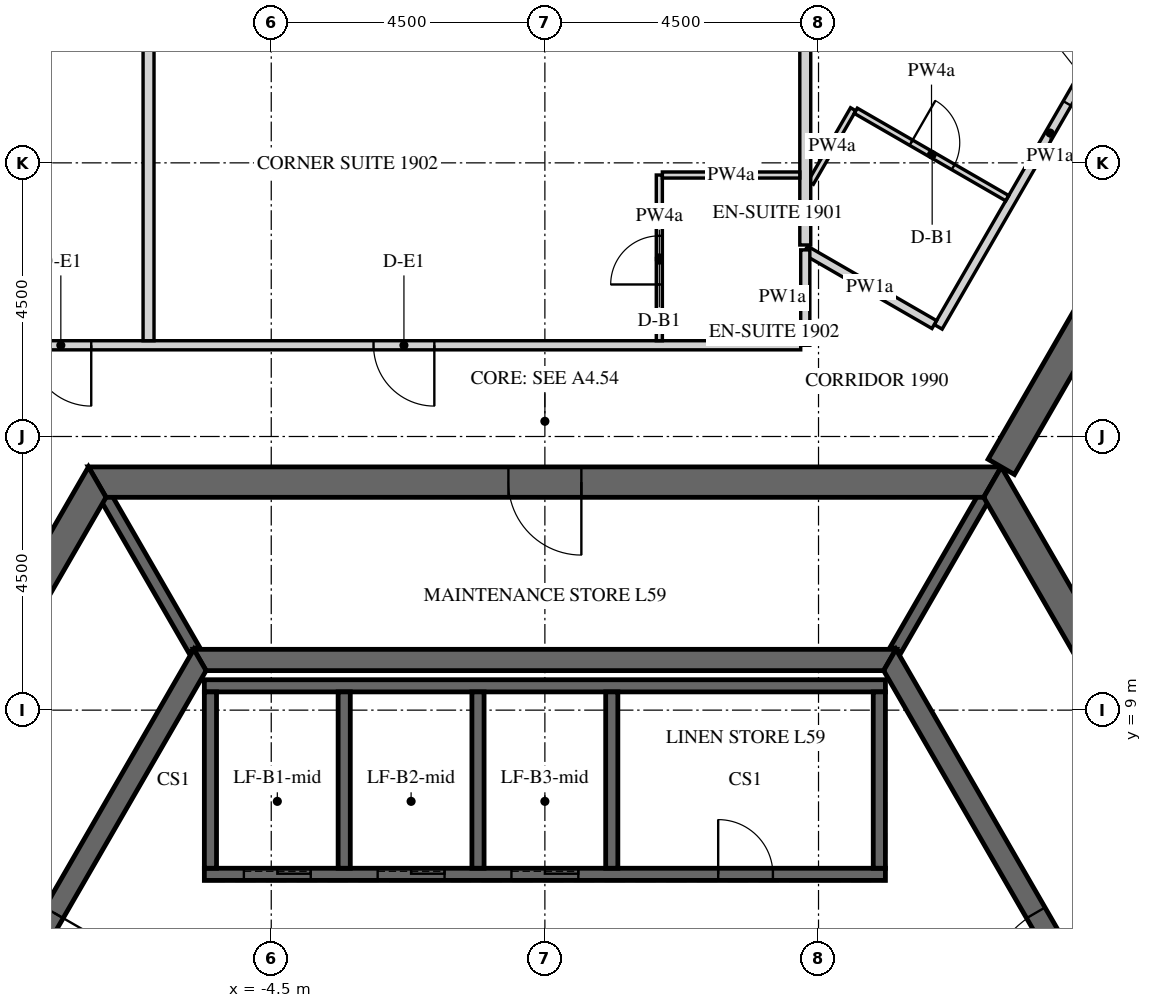
"""IFC4 building model, lengths in metres.
Left out: names, types, materials, properties, quantities, classifications, styles, units other than length and angle.
Written with IfcOpenShell. Run it as: python <this file> out.ifc"""

import sys

from ifc_helpers import new_model, si_unit, direction, frame, frame_2d, origin, place, context, subcontext, project, spatial, polyline, rectangle, outline, extrude, element, fill, save


model = new_model("IFC4")
c1 = context("Model", 3, precision=1e-05, world=origin(), true_north=direction((0.0, 1.0)))
c2 = subcontext(c1, "Body", "Model", "MODEL_VIEW")
j1 = project(units=[si_unit("LENGTHUNIT", "METRE"), si_unit("PLANEANGLEUNIT", "RADIAN")], contexts=[c1])
p1 = place(None, origin())
s1 = spatial("IfcSite", under=j1, at=p1, CompositionType="ELEMENT")
p2 = place(p1, origin())
s2 = spatial("IfcBuilding", under=s1, at=p2, CompositionType="ELEMENT")
p3 = place(p2, frame((0.0, 0.0, 246.3)))
s3 = spatial("IfcBuildingStorey", under=s2, at=p3, CompositionType="ELEMENT", Elevation=246.3)
p4 = place(p3, frame((-7.361, 12.75, -0.15), z_axis=(0.0, 0.0, 1.0), x_axis=(-0.50000571537, -0.866022103989, 0.0)))
e1 = element("IfcWall", 1, at=p4, inside=s3, PredefinedType="SHEAR", context=c2, shape_type="SweptSolid", body=[
    extrude(outline(polyline([(-0.144, -0.25), (14.867, -0.25), (14.578, 0.25), (0.144, 0.25), (-0.144, -0.25)])), origin(), (0.0, 0.0, 1.0), 3.75),
])
p5 = place(p4, frame((6.49, 0.0, 0.15)))
e2 = element("IfcOpeningElement", 2, at=p5, cuts=e1, PredefinedType="OPENING", context=c2, shape_type="SweptSolid", body=[
    extrude(rectangle(XDim=1.8, YDim=2.4, at=frame_2d((0.9, 1.2))), frame((0.0, 0.26, 0.0), z_axis=(0.0, -1.0, 0.0), x_axis=(1.0, 0.0, 0.0)), (0.0, 0.0, 1.0), 0.52),
])
p6 = place(p3, frame((14.722, 0.0, -0.15), z_axis=(0.0, 0.0, 1.0), x_axis=(-0.50000571537, 0.866022103989, 0.0)))
e3 = element("IfcWall", 3, at=p6, inside=s3, PredefinedType="SHEAR", context=c2, shape_type="SweptSolid", body=[
    extrude(outline(polyline([(-0.144, -0.25), (14.867, -0.25), (14.578, 0.25), (0.144, 0.25), (-0.144, -0.25)])), origin(), (0.0, 0.0, 1.0), 3.75),
])
p7 = place(p6, frame((6.432, 0.0, 0.15)))
e4 = element("IfcOpeningElement", 4, at=p7, cuts=e3, PredefinedType="OPENING", context=c2, shape_type="SweptSolid", body=[
    extrude(rectangle(XDim=1.8, YDim=2.4, at=frame_2d((0.9, 1.2))), frame((0.0, 0.26, 0.0), z_axis=(0.0, -1.0, 0.0), x_axis=(1.0, 0.0, 0.0)), (0.0, 0.0, 1.0), 0.52),
])
p8 = place(p3, frame((7.361, 12.75, -0.15), z_axis=(0.0, 0.0, 1.0), x_axis=(-1.0, 0.0, 0.0)))
e5 = element("IfcWall", 5, at=p8, inside=s3, PredefinedType="SHEAR", context=c2, shape_type="SweptSolid", body=[
    extrude(outline(polyline([(-0.144, -0.25), (14.866, -0.25), (14.578, 0.25), (0.144, 0.25), (-0.144, -0.25)])), origin(), (0.0, 0.0, 1.0), 3.75),
])
p9 = place(p8, frame((6.761, 0.0, 0.15)))
e6 = element("IfcOpeningElement", 6, at=p9, cuts=e5, PredefinedType="OPENING", context=c2, shape_type="SweptSolid", body=[
    extrude(rectangle(XDim=1.2, YDim=2.4, at=frame_2d((0.6, 1.2))), frame((0.0, 0.26, 0.0), z_axis=(0.0, -1.0, 0.0), x_axis=(1.0, 0.0, 0.0)), (0.0, 0.0, 1.0), 0.52),
])
p10 = place(p3, frame((7.506, 13.0, -0.15), z_axis=(0.0, 0.0, 1.0), x_axis=(0.499988271576, 0.866032175087, 0.0)))
e7 = element("IfcWall", 7, at=p10, inside=s3, PredefinedType="SHEAR", context=c2, shape_type="SweptSolid", body=[
    extrude(rectangle(XDim=15.424, YDim=0.5, at=frame_2d((7.712, 0.0))), origin(), (0.0, 0.0, 1.0), 3.75),
])
p11 = place(p10, frame((6.812, 0.0, 0.15)))
e8 = element("IfcOpeningElement", 8, at=p11, cuts=e7, PredefinedType="OPENING", context=c2, shape_type="SweptSolid", body=[
    extrude(rectangle(XDim=1.8, YDim=2.4, at=frame_2d((0.9, 1.2))), frame((0.0, 0.26, 0.0), z_axis=(0.0, -1.0, 0.0), x_axis=(1.0, 0.0, 0.0)), (0.0, 0.0, 1.0), 0.52),
])
p12 = place(p3, frame((-5.673, 9.825, -0.15), z_axis=(0.0, 0.0, 1.0), x_axis=(-0.499995046907, -0.866028263435, 0.0)))
e9 = element("IfcWall", 9, at=p12, inside=s3, PredefinedType="SHEAR", context=c2, shape_type="SweptSolid", body=[
    extrude(outline(polyline([(-0.101, -0.175), (11.446, -0.175), (11.244, 0.175), (0.101, 0.175), (-0.101, -0.175)])), origin(), (0.0, 0.0, 1.0), 3.75),
])
p13 = place(p12, frame((4.801, 0.0, 0.15)))
e10 = element("IfcOpeningElement", 10, at=p13, cuts=e9, PredefinedType="OPENING", context=c2, shape_type="SweptSolid", body=[
    extrude(rectangle(XDim=1.8, YDim=2.4, at=frame_2d((0.9, 1.2))), frame((0.0, 0.185, 0.0), z_axis=(0.0, -1.0, 0.0), x_axis=(1.0, 0.0, 0.0)), (0.0, 0.0, 1.0), 0.37),
])
p14 = place(p3, frame((11.345, 0.0, -0.15), z_axis=(0.0, 0.0, 1.0), x_axis=(-0.499995046907, 0.866028263435, 0.0)))
e11 = element("IfcWall", 11, at=p14, inside=s3, PredefinedType="SHEAR", context=c2, shape_type="SweptSolid", body=[
    extrude(outline(polyline([(-0.101, -0.175), (11.446, -0.175), (11.244, 0.175), (0.101, 0.175), (-0.101, -0.175)])), origin(), (0.0, 0.0, 1.0), 3.75),
])
p15 = place(p14, frame((4.744, 0.0, 0.15)))
e12 = element("IfcOpeningElement", 12, at=p15, cuts=e11, PredefinedType="OPENING", context=c2, shape_type="SweptSolid", body=[
    extrude(rectangle(XDim=1.8, YDim=2.4, at=frame_2d((0.9, 1.2))), frame((0.0, 0.185, 0.0), z_axis=(0.0, -1.0, 0.0), x_axis=(1.0, 0.0, 0.0)), (0.0, 0.0, 1.0), 0.37),
])
p16 = place(p3, frame((5.673, 9.825, -0.15), z_axis=(0.0, 0.0, 1.0), x_axis=(-1.0, 0.0, 0.0)))
e13 = element("IfcWall", 13, at=p16, inside=s3, PredefinedType="SHEAR", context=c2, shape_type="SweptSolid", body=[
    extrude(outline(polyline([(-0.101, -0.175), (11.446, -0.175), (11.244, 0.175), (0.101, 0.175), (-0.101, -0.175)])), origin(), (0.0, 0.0, 1.0), 3.75),
])
p17 = place(p3, frame((-5.6, 6.3, -0.25), z_axis=(0.0, 0.0, 1.0), x_axis=(1.0, 0.0, 0.0)))
e14 = element("IfcWall", 14, at=p17, inside=s3, PredefinedType="SHEAR", context=c2, shape_type="SweptSolid", body=[
    extrude(rectangle(XDim=11.2, YDim=0.2, at=frame_2d((5.6, 0.0))), origin(), (0.0, 0.0, 1.0), 3.9),
])
p18 = place(p17, frame((8.45, 0.0, 0.25)))
e15 = element("IfcOpeningElement", 15, at=p18, cuts=e14, PredefinedType="OPENING", context=c2, shape_type="SweptSolid", body=[
    extrude(rectangle(XDim=0.9, YDim=2.1, at=frame_2d((0.45, 1.05))), frame((0.0, 0.11, 0.0), z_axis=(0.0, -1.0, 0.0), x_axis=(1.0, 0.0, 0.0)), (0.0, 0.0, 1.0), 0.22),
])
p19 = place(p17, frame((0.65, 0.0, 0.25)))
e16 = element("IfcOpeningElement", 16, at=p19, cuts=e14, PredefinedType="OPENING", context=c2, shape_type="SweptSolid", body=[
    extrude(rectangle(XDim=1.1, YDim=2.1, at=frame_2d((0.55, 1.05))), frame((0.0, 0.11, 0.0), z_axis=(0.0, -1.0, 0.0), x_axis=(1.0, 0.0, 0.0)), (0.0, 0.0, 1.0), 0.22),
])
p20 = place(p17, frame((2.85, 0.0, 0.25)))
e17 = element("IfcOpeningElement", 17, at=p20, cuts=e14, PredefinedType="OPENING", context=c2, shape_type="SweptSolid", body=[
    extrude(rectangle(XDim=1.1, YDim=2.1, at=frame_2d((0.55, 1.05))), frame((0.0, 0.11, 0.0), z_axis=(0.0, -1.0, 0.0), x_axis=(1.0, 0.0, 0.0)), (0.0, 0.0, 1.0), 0.22),
])
p21 = place(p17, frame((5.05, 0.0, 0.25)))
e18 = element("IfcOpeningElement", 18, at=p21, cuts=e14, PredefinedType="OPENING", context=c2, shape_type="SweptSolid", body=[
    extrude(rectangle(XDim=1.1, YDim=2.1, at=frame_2d((0.55, 1.05))), frame((0.0, 0.11, 0.0), z_axis=(0.0, -1.0, 0.0), x_axis=(1.0, 0.0, 0.0)), (0.0, 0.0, 1.0), 0.22),
])
p22 = place(p3, frame((-5.6, 9.4, -0.25), z_axis=(0.0, 0.0, 1.0), x_axis=(1.0, 0.0, 0.0)))
e19 = element("IfcWall", 19, at=p22, inside=s3, PredefinedType="SHEAR", context=c2, shape_type="SweptSolid", body=[
    extrude(rectangle(XDim=11.2, YDim=0.2, at=frame_2d((5.6, 0.0))), origin(), (0.0, 0.0, 1.0), 3.9),
])
for number, where, z_axis, x_axis in (
    (20, (-5.5, 6.4, -0.25), (0.0, 0.0, 1.0), (0.0, 1.0, 0.0)),
    (21, (-3.3, 6.4, -0.25), (0.0, 0.0, 1.0), (0.0, 1.0, 0.0)),
    (22, (-1.1, 6.4, -0.25), (0.0, 0.0, 1.0), (0.0, 1.0, 0.0)),
    (23, (1.1, 6.4, -0.25), (0.0, 0.0, 1.0), (0.0, 1.0, 0.0)),
    (24, (5.5, 6.4, -0.25), (0.0, 0.0, 1.0), (0.0, 1.0, 0.0)),
):
    element("IfcWall", number, at=place(p3, frame(where, z_axis=z_axis, x_axis=x_axis)), inside=s3, PredefinedType="SHEAR", context=c2, shape_type="SweptSolid", body=[
        extrude(rectangle(XDim=2.9, YDim=0.2, at=frame_2d((1.45, 0.0))), origin(), (0.0, 0.0, 1.0), 3.9),
    ])
for number, where, z_axis, x_axis in (
    (25, (5.773, 10.0, -0.15), (0.0, 0.0, 1.0), (0.5, 0.866, 0.0)),
    (26, (-5.773, 10.0, -0.15), (0.0, 0.0, 1.0), (-0.5, 0.866, 0.0)),
):
    element("IfcWall", number, at=place(p3, frame(where, z_axis=z_axis, x_axis=x_axis)), inside=s3, PredefinedType="SHEAR", context=c2, shape_type="SweptSolid", body=[
        extrude(rectangle(XDim=2.887, YDim=0.2, at=frame_2d((1.443, 0.0))), origin(), (0.0, 0.0, 1.0), 3.75),
    ])
p23 = place(p3, frame((10.149, 21.678, 0.0), z_axis=(0.0, 0.0, 1.0), x_axis=(-0.500020076982, -0.866013812023, 0.0)))
e27 = element("IfcWall", 27, at=p23, inside=s3, PredefinedType="PARTITIONING", context=c2, shape_type="SweptSolid", body=[
    extrude(rectangle(XDim=7.361, YDim=0.15, at=frame_2d((3.681, 0.0))), origin(), (0.0, 0.0, 1.0), 2.838),
])
p24 = place(p23, frame((2.118, 0.0, 0.0)))
e28 = element("IfcOpeningElement", 28, at=p24, cuts=e27, PredefinedType="OPENING", context=c2, shape_type="SweptSolid", body=[
    extrude(rectangle(XDim=1.0, YDim=2.1, at=frame_2d((0.5, 1.05))), frame((0.0, 0.085, 0.0), z_axis=(0.0, -1.0, 0.0), x_axis=(1.0, 0.0, 0.0)), (0.0, 0.0, 1.0), 0.17),
])
p25 = place(p3, frame((6.403, 15.341, 0.0), z_axis=(0.0, 0.0, 1.0), x_axis=(-0.8660013066, 0.500041735226, 0.0)))
e29 = element("IfcWall", 29, at=p25, inside=s3, PredefinedType="PARTITIONING", context=c2, shape_type="SweptSolid", body=[
    extrude(rectangle(XDim=2.449, YDim=0.15, at=frame_2d((1.225, 0.0))), origin(), (0.0, 0.0, 1.0), 2.838),
])
p26 = place(p3, frame((4.207, 15.0, 0.0), z_axis=(0.0, 0.0, 1.0), x_axis=(-1.0, 0.0, 0.0)))
e30 = element("IfcWall", 30, at=p26, inside=s3, PredefinedType="PARTITIONING", context=c2, shape_type="SweptSolid", body=[
    extrude(rectangle(XDim=12.867, YDim=0.15, at=frame_2d((6.434, 0.0))), origin(), (0.0, 0.0, 1.0), 2.838),
])
p27 = place(p26, frame((6.025, 0.0, 0.0)))
e31 = element("IfcOpeningElement", 31, at=p27, cuts=e30, PredefinedType="OPENING", context=c2, shape_type="SweptSolid", body=[
    extrude(rectangle(XDim=1.0, YDim=2.1, at=frame_2d((0.5, 1.05))), frame((0.0, 0.085, 0.0), z_axis=(0.0, -1.0, 0.0), x_axis=(1.0, 0.0, 0.0)), (0.0, 0.0, 1.0), 0.17),
])
p28 = place(p26, frame((11.667, 0.0, 0.0)))
e32 = element("IfcOpeningElement", 32, at=p28, cuts=e30, PredefinedType="OPENING", context=c2, shape_type="SweptSolid", body=[
    extrude(rectangle(XDim=1.0, YDim=2.1, at=frame_2d((0.5, 1.05))), frame((0.0, 0.085, 0.0), z_axis=(0.0, -1.0, 0.0), x_axis=(1.0, 0.0, 0.0)), (0.0, 0.0, 1.0), 0.17),
])
p29 = place(p3, frame((4.282, 16.569, 0.0), z_axis=(0.0, 0.0, 1.0), x_axis=(0.0, -1.0, 0.0)))
e33 = element("IfcWall", 33, at=p29, inside=s3, PredefinedType="PARTITIONING", context=c2, shape_type="SweptSolid", body=[
    extrude(rectangle(XDim=1.569, YDim=0.15, at=frame_2d((0.785, 0.0))), origin(), (0.0, 0.0, 1.0), 2.838),
])
p30 = place(p3, frame((4.372, 17.673, 0.0), z_axis=(0.0, 0.0, 1.0), x_axis=(0.50007068215, 0.86598459158, 0.0)))
e34 = element("IfcWall", 34, at=p30, inside=s3, PredefinedType="PARTITIONING", context=c2, shape_type="SweptSolid", body=[
    extrude(rectangle(XDim=1.396, YDim=0.1, at=frame_2d((0.698, 0.0))), origin(), (0.0, 0.0, 1.0), 2.838),
])
p31 = place(p3, frame((5.113, 18.857, 0.0), z_axis=(0.0, 0.0, 1.0), x_axis=(0.866039941686, -0.499974818771, 0.0)))
e35 = element("IfcWall", 35, at=p31, inside=s3, PredefinedType="PARTITIONING", context=c2, shape_type="SweptSolid", body=[
    extrude(rectangle(XDim=2.875, YDim=0.1, at=frame_2d((1.438, 0.0))), origin(), (0.0, 0.0, 1.0), 2.838),
])
p32 = place(p31, frame((1.05, 0.0, 0.0)))
e36 = element("IfcOpeningElement", 36, at=p32, cuts=e35, PredefinedType="OPENING", context=c2, shape_type="SweptSolid", body=[
    extrude(rectangle(XDim=0.8, YDim=2.1, at=frame_2d((0.4, 1.05))), frame((0.0, 0.06, 0.0), z_axis=(0.0, -1.0, 0.0), x_axis=(1.0, 0.0, 0.0)), (0.0, 0.0, 1.0), 0.12),
])
p33 = place(p3, frame((4.282, 27.45, 0.0), z_axis=(0.0, 0.0, 1.0), x_axis=(0.0, -1.0, 0.0)))
e37 = element("IfcWall", 37, at=p33, inside=s3, PredefinedType="PARTITIONING", context=c2, shape_type="SweptSolid", body=[
    extrude(rectangle(XDim=10.801, YDim=0.18, at=frame_2d((5.4, 0.0))), origin(), (0.0, 0.0, 1.0), 2.838),
])
p34 = place(p3, frame((1.882, 15.075, 0.0), z_axis=(0.0, 0.0, 1.0), x_axis=(0.0, 1.0, 0.0)))
e38 = element("IfcWall", 38, at=p34, inside=s3, PredefinedType="PARTITIONING", context=c2, shape_type="SweptSolid", body=[
    extrude(rectangle(XDim=2.725, YDim=0.1, at=frame_2d((1.363, 0.0))), origin(), (0.0, 0.0, 1.0), 2.838),
])
p35 = place(p34, frame((0.925, 0.0, 0.0)))
e39 = element("IfcOpeningElement", 39, at=p35, cuts=e38, PredefinedType="OPENING", context=c2, shape_type="SweptSolid", body=[
    extrude(rectangle(XDim=0.8, YDim=2.1, at=frame_2d((0.4, 1.05))), frame((0.0, 0.06, 0.0), z_axis=(0.0, -1.0, 0.0), x_axis=(1.0, 0.0, 0.0)), (0.0, 0.0, 1.0), 0.12),
])
p36 = place(p3, frame((1.932, 17.8, 0.0), z_axis=(0.0, 0.0, 1.0), x_axis=(1.0, 0.0, 0.0)))
e40 = element("IfcWall", 40, at=p36, inside=s3, PredefinedType="PARTITIONING", context=c2, shape_type="SweptSolid", body=[
    extrude(rectangle(XDim=2.26, YDim=0.1, at=frame_2d((1.13, 0.0))), origin(), (0.0, 0.0, 1.0), 2.838),
])
p37 = place(p3, frame((-6.518, 27.45, 0.0), z_axis=(0.0, 0.0, 1.0), x_axis=(0.0, -1.0, 0.0)))
e41 = element("IfcWall", 41, at=p37, inside=s3, PredefinedType="PARTITIONING", context=c2, shape_type="SweptSolid", body=[
    extrude(rectangle(XDim=12.375, YDim=0.18, at=frame_2d((6.188, 0.0))), origin(), (0.0, 0.0, 1.0), 2.838),
])
p38 = place(p9, origin())
e42 = element("IfcDoor", 42, at=p38, inside=s3, OperationType="SINGLE_SWING_LEFT", PredefinedType="DOOR", context=c2, shape_type="SweptSolid", body=[
    extrude(rectangle(XDim=1.2, YDim=2.4, at=frame_2d((0.6, 1.2))), frame((0.0, 0.025, 0.0), z_axis=(0.0, -1.0, 0.0), x_axis=(1.0, 0.0, 0.0)), (0.0, 0.0, 1.0), 0.05),
])
fill(e6, e42)
p39 = place(p13, origin())
e43 = element("IfcDoor", 43, at=p39, inside=s3, OperationType="DOUBLE_DOOR_SINGLE_SWING", PredefinedType="DOOR", context=c2, shape_type="SweptSolid", body=[
    extrude(rectangle(XDim=1.8, YDim=2.4, at=frame_2d((0.9, 1.2))), frame((0.0, 0.025, 0.0), z_axis=(0.0, -1.0, 0.0), x_axis=(1.0, 0.0, 0.0)), (0.0, 0.0, 1.0), 0.05),
])
fill(e10, e43)
p40 = place(p15, origin())
e44 = element("IfcDoor", 44, at=p40, inside=s3, OperationType="DOUBLE_DOOR_SINGLE_SWING", PredefinedType="DOOR", context=c2, shape_type="SweptSolid", body=[
    extrude(rectangle(XDim=1.8, YDim=2.4, at=frame_2d((0.9, 1.2))), frame((0.0, 0.025, 0.0), z_axis=(0.0, -1.0, 0.0), x_axis=(1.0, 0.0, 0.0)), (0.0, 0.0, 1.0), 0.05),
])
fill(e12, e44)
p41 = place(p18, origin())
e45 = element("IfcDoor", 45, at=p41, inside=s3, OperationType="SINGLE_SWING_LEFT", PredefinedType="DOOR", context=c2, shape_type="SweptSolid", body=[
    extrude(rectangle(XDim=0.9, YDim=2.1, at=frame_2d((0.45, 1.05))), frame((0.0, 0.025, 0.0), z_axis=(0.0, -1.0, 0.0), x_axis=(1.0, 0.0, 0.0)), (0.0, 0.0, 1.0), 0.05),
])
fill(e15, e45)
p42 = place(p19, origin())
e46 = element("IfcDoor", 46, at=p42, inside=s3, OperationType="SLIDING_TO_LEFT", PredefinedType="DOOR", context=c2, shape_type="SweptSolid", body=[
    extrude(rectangle(XDim=1.1, YDim=2.1, at=frame_2d((0.55, 1.05))), frame((0.0, 0.025, 0.0), z_axis=(0.0, -1.0, 0.0), x_axis=(1.0, 0.0, 0.0)), (0.0, 0.0, 1.0), 0.05),
])
fill(e16, e46)
p43 = place(p20, origin())
e47 = element("IfcDoor", 47, at=p43, inside=s3, OperationType="SLIDING_TO_LEFT", PredefinedType="DOOR", context=c2, shape_type="SweptSolid", body=[
    extrude(rectangle(XDim=1.1, YDim=2.1, at=frame_2d((0.55, 1.05))), frame((0.0, 0.025, 0.0), z_axis=(0.0, -1.0, 0.0), x_axis=(1.0, 0.0, 0.0)), (0.0, 0.0, 1.0), 0.05),
])
fill(e17, e47)
p44 = place(p21, origin())
e48 = element("IfcDoor", 48, at=p44, inside=s3, OperationType="SLIDING_TO_LEFT", PredefinedType="DOOR", context=c2, shape_type="SweptSolid", body=[
    extrude(rectangle(XDim=1.1, YDim=2.1, at=frame_2d((0.55, 1.05))), frame((0.0, 0.025, 0.0), z_axis=(0.0, -1.0, 0.0), x_axis=(1.0, 0.0, 0.0)), (0.0, 0.0, 1.0), 0.05),
])
fill(e18, e48)
p45 = place(p24, origin())
e49 = element("IfcDoor", 49, at=p45, inside=s3, OperationType="SINGLE_SWING_LEFT", PredefinedType="DOOR", context=c2, shape_type="SweptSolid", body=[
    extrude(rectangle(XDim=1.0, YDim=2.1, at=frame_2d((0.5, 1.05))), frame((0.0, 0.025, 0.0), z_axis=(0.0, -1.0, 0.0), x_axis=(1.0, 0.0, 0.0)), (0.0, 0.0, 1.0), 0.05),
])
fill(e28, e49)
p46 = place(p32, origin())
e50 = element("IfcDoor", 50, at=p46, inside=s3, OperationType="SINGLE_SWING_RIGHT", PredefinedType="DOOR", context=c2, shape_type="SweptSolid", body=[
    extrude(rectangle(XDim=0.8, YDim=2.1, at=frame_2d((0.4, 1.05))), frame((0.0, 0.025, 0.0), z_axis=(0.0, -1.0, 0.0), x_axis=(1.0, 0.0, 0.0)), (0.0, 0.0, 1.0), 0.05),
])
fill(e36, e50)
p47 = place(p27, origin())
e51 = element("IfcDoor", 51, at=p47, inside=s3, OperationType="SINGLE_SWING_RIGHT", PredefinedType="DOOR", context=c2, shape_type="SweptSolid", body=[
    extrude(rectangle(XDim=1.0, YDim=2.1, at=frame_2d((0.5, 1.05))), frame((0.0, 0.025, 0.0), z_axis=(0.0, -1.0, 0.0), x_axis=(1.0, 0.0, 0.0)), (0.0, 0.0, 1.0), 0.05),
])
fill(e31, e51)
p48 = place(p35, origin())
e52 = element("IfcDoor", 52, at=p48, inside=s3, OperationType="SINGLE_SWING_RIGHT", PredefinedType="DOOR", context=c2, shape_type="SweptSolid", body=[
    extrude(rectangle(XDim=0.8, YDim=2.1, at=frame_2d((0.4, 1.05))), frame((0.0, 0.025, 0.0), z_axis=(0.0, -1.0, 0.0), x_axis=(1.0, 0.0, 0.0)), (0.0, 0.0, 1.0), 0.05),
])
fill(e39, e52)
p49 = place(p28, origin())
e53 = element("IfcDoor", 53, at=p49, inside=s3, OperationType="SINGLE_SWING_LEFT", PredefinedType="DOOR", context=c2, shape_type="SweptSolid", body=[
    extrude(rectangle(XDim=1.0, YDim=2.1, at=frame_2d((0.5, 1.05))), frame((0.0, 0.025, 0.0), z_axis=(0.0, -1.0, 0.0), x_axis=(1.0, 0.0, 0.0)), (0.0, 0.0, 1.0), 0.05),
])
fill(e32, e53)
save(model, sys.argv[1])
